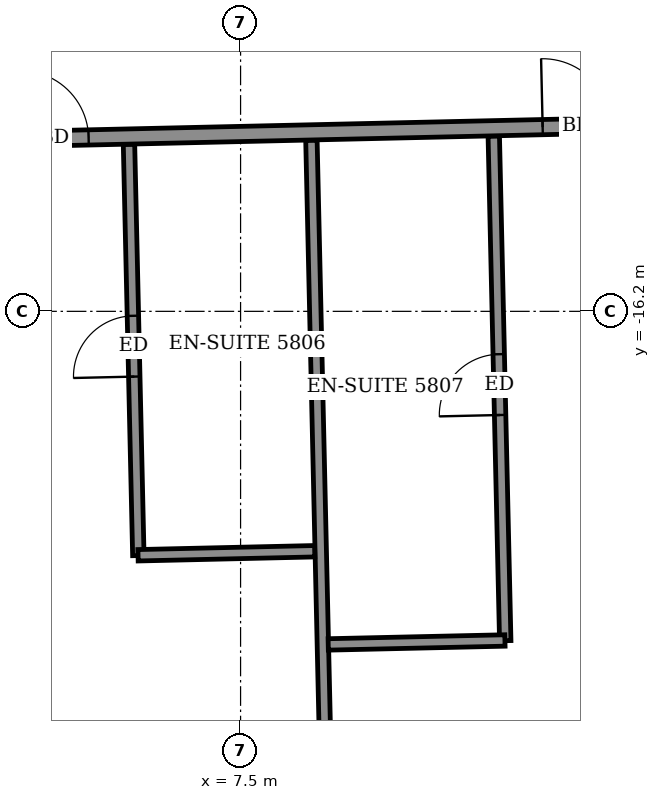
"""IFC4 building model, lengths in metres.
Left out: names, types, materials, properties, quantities, classifications, styles, units other than length and angle.
Written with IfcOpenShell. Run it as: python <this file> out.ifc"""

import sys

from ifc_helpers import new_model, si_unit, direction, frame, frame_2d, origin, place, context, subcontext, project, spatial, rectangle, extrude, element, fill, save


model = new_model("IFC4")
c1 = context("Model", 3, precision=1e-05, world=origin(), true_north=direction((0.0, 1.0)))
c2 = subcontext(c1, "Body", "Model", "MODEL_VIEW")
j1 = project(units=[si_unit("LENGTHUNIT", "METRE"), si_unit("PLANEANGLEUNIT", "RADIAN")], contexts=[c1])
p1 = place(None, origin())
s1 = spatial("IfcSite", under=j1, at=p1, CompositionType="ELEMENT")
p2 = place(p1, origin())
s2 = spatial("IfcBuilding", under=s1, at=p2, CompositionType="ELEMENT")
p3 = place(p2, frame((0.0, 0.0, 231.1)))
s3 = spatial("IfcBuildingStorey", under=s2, at=p3, CompositionType="ELEMENT", Elevation=231.1)
p4 = place(p3, frame((8.69, -25.323, 0.0), z_axis=(0.0, 0.0, 1.0), x_axis=(-0.022684355347, 0.999742676904, 0.0)))
e1 = element("IfcWall", 1, at=p4, inside=s3, PredefinedType="PARTITIONING", context=c2, shape_type="SweptSolid", body=[
    extrude(rectangle(XDim=11.376, YDim=0.15, at=frame_2d((5.688, 0.0))), origin(), (0.0, 0.0, 1.0), 2.5),
])
p5 = place(p3, frame((10.982, -20.533, 0.0), z_axis=(0.0, 0.0, 1.0), x_axis=(-0.02272391111, 0.999741778593, 0.0)))
e2 = element("IfcWall", 2, at=p5, inside=s3, PredefinedType="PARTITIONING", context=c2, shape_type="SweptSolid", body=[
    extrude(rectangle(XDim=6.64, YDim=0.15, at=frame_2d((3.32, 0.0))), origin(), (0.0, 0.0, 1.0), 3.05),
])
p6 = place(p5, frame((2.97, 0.0, 0.0)))
e3 = element("IfcOpeningElement", 3, at=p6, cuts=e2, PredefinedType="OPENING", context=c2, shape_type="SweptSolid", body=[
    extrude(rectangle(XDim=0.8, YDim=2.1, at=frame_2d((0.4, 1.05))), frame((0.0, 0.085, 0.0), z_axis=(0.0, -1.0, 0.0), x_axis=(1.0, 0.0, 0.0)), (0.0, 0.0, 1.0), 0.17),
])
p7 = place(p3, frame((8.653, -20.582, 0.0), z_axis=(0.0, 0.0, 1.0), x_axis=(0.999749954681, 0.022361308448, 0.0)))
e4 = element("IfcWall", 4, at=p7, inside=s3, PredefinedType="PARTITIONING", context=c2, shape_type="SweptSolid", body=[
    extrude(rectangle(XDim=2.325, YDim=0.15, at=frame_2d((1.163, 0.0))), origin(), (0.0, 0.0, 1.0), 3.05),
])
p8 = place(p3, frame((6.155, -19.413, 0.0), z_axis=(0.0, 0.0, 1.0), x_axis=(-0.022741905136, 0.999741369431, 0.0)))
e5 = element("IfcWall", 5, at=p8, inside=s3, PredefinedType="PARTITIONING", context=c2, shape_type="SweptSolid", body=[
    extrude(rectangle(XDim=5.411, YDim=0.15, at=frame_2d((2.705, 0.0))), origin(), (0.0, 0.0, 1.0), 3.05),
])
p9 = place(p8, frame((2.355, 0.0, 0.0)))
e6 = element("IfcOpeningElement", 6, at=p9, cuts=e5, PredefinedType="OPENING", context=c2, shape_type="SweptSolid", body=[
    extrude(rectangle(XDim=0.8, YDim=2.1, at=frame_2d((0.4, 1.05))), frame((0.0, 0.085, 0.0), z_axis=(0.0, -1.0, 0.0), x_axis=(1.0, 0.0, 0.0)), (0.0, 0.0, 1.0), 0.17),
])
p10 = place(p3, frame((6.151, -19.409, 0.0), z_axis=(0.0, 0.0, 1.0), x_axis=(0.99974031529, 0.022788198363, 0.0)))
e7 = element("IfcWall", 7, at=p10, inside=s3, PredefinedType="PARTITIONING", context=c2, shape_type="SweptSolid", body=[
    extrude(rectangle(XDim=2.325, YDim=0.15, at=frame_2d((1.162, 0.0))), origin(), (0.0, 0.0, 1.0), 3.05),
])
p11 = place(p3, frame((-27.016, -14.65, 0.0), z_axis=(0.0, 0.0, 1.0), x_axis=(0.999742623033, 0.022686729391, 0.0)))
e8 = element("IfcWall", 8, at=p11, inside=s3, PredefinedType="PARTITIONING", context=c2, shape_type="SweptSolid", body=[
    extrude(rectangle(XDim=50.858, YDim=0.2, at=frame_2d((25.429, 0.0))), origin(), (0.0, 0.0, 1.0), 3.05),
])
p12 = place(p11, frame((1.625, 0.0, 0.0)))
e9 = element("IfcOpeningElement", 9, at=p12, cuts=e8, PredefinedType="OPENING", context=c2, shape_type="SweptSolid", body=[
    extrude(rectangle(XDim=1.0, YDim=2.1, at=frame_2d((0.5, 1.05))), frame((0.0, 0.11, 0.0), z_axis=(0.0, -1.0, 0.0), x_axis=(1.0, 0.0, 0.0)), (0.0, 0.0, 1.0), 0.22),
])
p13 = place(p11, frame((6.6, 0.0, 0.0)))
e10 = element("IfcOpeningElement", 10, at=p13, cuts=e8, PredefinedType="OPENING", context=c2, shape_type="SweptSolid", body=[
    extrude(rectangle(XDim=0.9, YDim=2.1, at=frame_2d((0.45, 1.05))), frame((0.0, 0.11, 0.0), z_axis=(0.0, -1.0, 0.0), x_axis=(1.0, 0.0, 0.0)), (0.0, 0.0, 1.0), 0.22),
])
p14 = place(p11, frame((11.5, 0.0, 0.0)))
e11 = element("IfcOpeningElement", 11, at=p14, cuts=e8, PredefinedType="OPENING", context=c2, shape_type="SweptSolid", body=[
    extrude(rectangle(XDim=0.9, YDim=2.1, at=frame_2d((0.45, 1.05))), frame((0.0, 0.11, 0.0), z_axis=(0.0, -1.0, 0.0), x_axis=(1.0, 0.0, 0.0)), (0.0, 0.0, 1.0), 0.22),
])
p15 = place(p11, frame((13.675, 0.0, 0.0)))
e12 = element("IfcOpeningElement", 12, at=p15, cuts=e8, PredefinedType="OPENING", context=c2, shape_type="SweptSolid", body=[
    extrude(rectangle(XDim=0.9, YDim=2.1, at=frame_2d((0.45, 1.05))), frame((0.0, 0.11, 0.0), z_axis=(0.0, -1.0, 0.0), x_axis=(1.0, 0.0, 0.0)), (0.0, 0.0, 1.0), 0.22),
])
p16 = place(p11, frame((20.625, 0.0, 0.0)))
e13 = element("IfcOpeningElement", 13, at=p16, cuts=e8, PredefinedType="OPENING", context=c2, shape_type="SweptSolid", body=[
    extrude(rectangle(XDim=0.9, YDim=2.1, at=frame_2d((0.45, 1.05))), frame((0.0, 0.11, 0.0), z_axis=(0.0, -1.0, 0.0), x_axis=(1.0, 0.0, 0.0)), (0.0, 0.0, 1.0), 0.22),
])
p17 = place(p11, frame((22.775, 0.0, 0.0)))
e14 = element("IfcOpeningElement", 14, at=p17, cuts=e8, PredefinedType="OPENING", context=c2, shape_type="SweptSolid", body=[
    extrude(rectangle(XDim=0.9, YDim=2.1, at=frame_2d((0.45, 1.05))), frame((0.0, 0.11, 0.0), z_axis=(0.0, -1.0, 0.0), x_axis=(1.0, 0.0, 0.0)), (0.0, 0.0, 1.0), 0.22),
])
p18 = place(p11, frame((29.65, 0.0, 0.0)))
e15 = element("IfcOpeningElement", 15, at=p18, cuts=e8, PredefinedType="OPENING", context=c2, shape_type="SweptSolid", body=[
    extrude(rectangle(XDim=0.9, YDim=2.1, at=frame_2d((0.45, 1.05))), frame((0.0, 0.11, 0.0), z_axis=(0.0, -1.0, 0.0), x_axis=(1.0, 0.0, 0.0)), (0.0, 0.0, 1.0), 0.22),
])
p19 = place(p11, frame((31.625, 0.0, 0.0)))
e16 = element("IfcOpeningElement", 16, at=p19, cuts=e8, PredefinedType="OPENING", context=c2, shape_type="SweptSolid", body=[
    extrude(rectangle(XDim=0.9, YDim=2.1, at=frame_2d((0.45, 1.05))), frame((0.0, 0.11, 0.0), z_axis=(0.0, -1.0, 0.0), x_axis=(1.0, 0.0, 0.0)), (0.0, 0.0, 1.0), 0.22),
])
p20 = place(p11, frame((38.5, 0.0, 0.0)))
e17 = element("IfcOpeningElement", 17, at=p20, cuts=e8, PredefinedType="OPENING", context=c2, shape_type="SweptSolid", body=[
    extrude(rectangle(XDim=0.9, YDim=2.1, at=frame_2d((0.45, 1.05))), frame((0.0, 0.11, 0.0), z_axis=(0.0, -1.0, 0.0), x_axis=(1.0, 0.0, 0.0)), (0.0, 0.0, 1.0), 0.22),
])
p21 = place(p11, frame((40.55, 0.0, 0.0)))
e18 = element("IfcOpeningElement", 18, at=p21, cuts=e8, PredefinedType="OPENING", context=c2, shape_type="SweptSolid", body=[
    extrude(rectangle(XDim=0.9, YDim=2.1, at=frame_2d((0.45, 1.05))), frame((0.0, 0.11, 0.0), z_axis=(0.0, -1.0, 0.0), x_axis=(1.0, 0.0, 0.0)), (0.0, 0.0, 1.0), 0.22),
])
p22 = place(p11, frame((47.601, 0.0, 0.0)))
e19 = element("IfcOpeningElement", 19, at=p22, cuts=e8, PredefinedType="OPENING", context=c2, shape_type="SweptSolid", body=[
    extrude(rectangle(XDim=1.0, YDim=2.1, at=frame_2d((0.5, 1.05))), frame((0.0, 0.11, 0.0), z_axis=(0.0, -1.0, 0.0), x_axis=(1.0, 0.0, 0.0)), (0.0, 0.0, 1.0), 0.22),
])
p23 = place(p19, origin())
e20 = element("IfcDoor", 20, at=p23, inside=s3, OperationType="SINGLE_SWING_RIGHT", PredefinedType="DOOR", context=c2, shape_type="SweptSolid", body=[
    extrude(rectangle(XDim=0.9, YDim=2.1, at=frame_2d((0.45, 1.05))), frame((0.0, 0.025, 0.0), z_axis=(0.0, -1.0, 0.0), x_axis=(1.0, 0.0, 0.0)), (0.0, 0.0, 1.0), 0.05),
])
fill(e16, e20)
p24 = place(p9, origin())
e21 = element("IfcDoor", 21, at=p24, inside=s3, OperationType="SINGLE_SWING_RIGHT", PredefinedType="DOOR", context=c2, shape_type="SweptSolid", body=[
    extrude(rectangle(XDim=0.8, YDim=2.1, at=frame_2d((0.4, 1.05))), frame((0.0, 0.025, 0.0), z_axis=(0.0, -1.0, 0.0), x_axis=(1.0, 0.0, 0.0)), (0.0, 0.0, 1.0), 0.05),
])
fill(e6, e21)
p25 = place(p20, origin())
e22 = element("IfcDoor", 22, at=p25, inside=s3, OperationType="SINGLE_SWING_LEFT", PredefinedType="DOOR", context=c2, shape_type="SweptSolid", body=[
    extrude(rectangle(XDim=0.9, YDim=2.1, at=frame_2d((0.45, 1.05))), frame((0.0, 0.025, 0.0), z_axis=(0.0, -1.0, 0.0), x_axis=(1.0, 0.0, 0.0)), (0.0, 0.0, 1.0), 0.05),
])
fill(e17, e22)
p26 = place(p6, origin())
e23 = element("IfcDoor", 23, at=p26, inside=s3, OperationType="SINGLE_SWING_LEFT", PredefinedType="DOOR", context=c2, shape_type="SweptSolid", body=[
    extrude(rectangle(XDim=0.8, YDim=2.1, at=frame_2d((0.4, 1.05))), frame((0.0, 0.025, 0.0), z_axis=(0.0, -1.0, 0.0), x_axis=(1.0, 0.0, 0.0)), (0.0, 0.0, 1.0), 0.05),
])
fill(e3, e23)
save(model, sys.argv[1])
